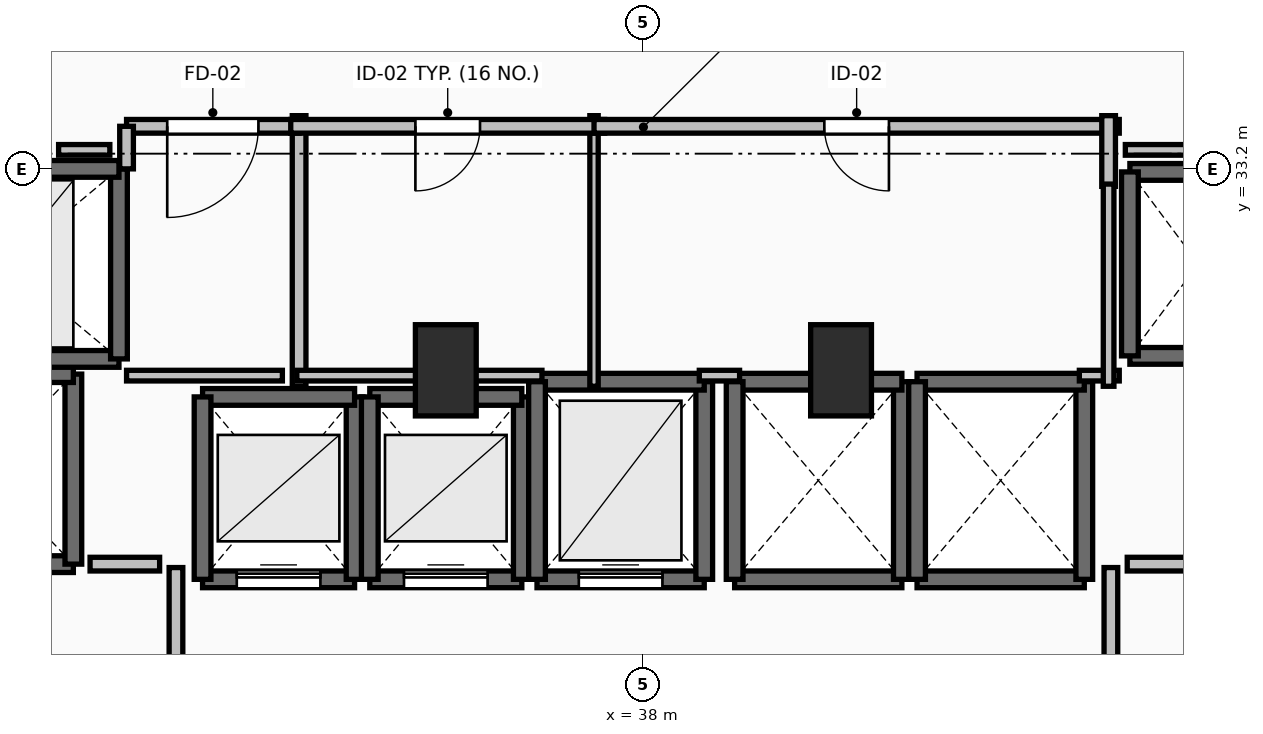
"""IFC4 building model, lengths in metres.
Left out: names, types, materials, properties, quantities, classifications, styles, units other than length and angle.
Written with IfcOpenShell. Run it as: python <this file> out.ifc"""

import sys

from ifc_helpers import new_model, si_unit, direction, frame, frame_2d, origin, origin_2d, place, context, subcontext, project, spatial, rectangle, extrude, element, fill, save


model = new_model("IFC4")
c1 = context("Model", 3, precision=1e-05, world=origin(), true_north=direction((0.0, 1.0)))
c2 = subcontext(c1, "Body", "Model", "MODEL_VIEW")
j1 = project(units=[si_unit("LENGTHUNIT", "METRE"), si_unit("PLANEANGLEUNIT", "RADIAN")], contexts=[c1])
p1 = place(None, origin())
s1 = spatial("IfcSite", under=j1, at=p1, CompositionType="ELEMENT")
p2 = place(p1, origin())
s2 = spatial("IfcBuilding", under=s1, at=p2, CompositionType="ELEMENT")
p3 = place(p2, frame((0.0, 0.0, 96.3)))
s3 = spatial("IfcBuildingStorey", under=s2, at=p3, CompositionType="ELEMENT", Elevation=96.3)
for number, where, z_axis, x_axis in (
    (1, (35.4, 30.55, 0.0), (0.0, 0.0, 1.0), (1.0, 0.0, 0.0)),
    (2, (40.6, 30.55, 0.0), (0.0, 0.0, 1.0), (1.0, 0.0, 0.0)),
):
    element("IfcColumn", number, at=place(p3, frame(where, z_axis=z_axis, x_axis=x_axis)), inside=s3, PredefinedType="PILASTER", context=c2, shape_type="SweptSolid", body=[
        extrude(rectangle(XDim=0.8, YDim=1.2, at=origin_2d()), origin(), (0.0, 0.0, 1.0), 3.5),
    ])
p4 = place(p3, frame((32.2, 27.8, 0.0), z_axis=(0.0, 0.0, 1.0), x_axis=(1.0, 0.0, 0.0)))
e3 = element("IfcWall", 3, at=p4, inside=s3, PredefinedType="SOLIDWALL", context=c2, shape_type="SweptSolid", body=[
    extrude(rectangle(XDim=2.0, YDim=0.22, at=frame_2d((1.0, 0.0))), origin(), (0.0, 0.0, 1.0), 3.24),
])
p5 = place(p4, frame((0.45, 0.0, 0.0)))
e4 = element("IfcOpeningElement", 4, at=p5, cuts=e3, PredefinedType="OPENING", context=c2, shape_type="SweptSolid", body=[
    extrude(rectangle(XDim=1.1, YDim=2.2, at=frame_2d((0.55, 1.1))), frame((0.0, 0.125, 0.0), z_axis=(0.0, -1.0, 0.0), x_axis=(1.0, 0.0, 0.0)), (0.0, 0.0, 1.0), 0.25),
])
p6 = place(p3, frame((34.2, 27.8, 0.0), z_axis=(0.0, 0.0, 1.0), x_axis=(0.0, 1.0, 0.0)))
e5 = element("IfcWall", 5, at=p6, inside=s3, PredefinedType="SOLIDWALL", context=c2, shape_type="SweptSolid", body=[
    extrude(rectangle(XDim=2.4, YDim=0.22, at=frame_2d((1.2, 0.0))), origin(), (0.0, 0.0, 1.0), 3.24),
])
p7 = place(p3, frame((34.2, 30.2, 0.0), z_axis=(0.0, 0.0, 1.0), x_axis=(-1.0, 0.0, 0.0)))
e6 = element("IfcWall", 6, at=p7, inside=s3, PredefinedType="SOLIDWALL", context=c2, shape_type="SweptSolid", body=[
    extrude(rectangle(XDim=2.0, YDim=0.22, at=frame_2d((1.0, 0.0))), origin(), (0.0, 0.0, 1.0), 3.24),
])
p8 = place(p3, frame((32.2, 30.2, 0.0), z_axis=(0.0, 0.0, 1.0), x_axis=(0.0, -1.0, 0.0)))
e7 = element("IfcWall", 7, at=p8, inside=s3, PredefinedType="SOLIDWALL", context=c2, shape_type="SweptSolid", body=[
    extrude(rectangle(XDim=2.4, YDim=0.22, at=frame_2d((1.2, 0.0))), origin(), (0.0, 0.0, 1.0), 3.24),
])
p9 = place(p3, frame((34.4, 27.8, 0.0), z_axis=(0.0, 0.0, 1.0), x_axis=(1.0, 0.0, 0.0)))
e8 = element("IfcWall", 8, at=p9, inside=s3, PredefinedType="SOLIDWALL", context=c2, shape_type="SweptSolid", body=[
    extrude(rectangle(XDim=2.0, YDim=0.22, at=frame_2d((1.0, 0.0))), origin(), (0.0, 0.0, 1.0), 3.24),
])
p10 = place(p9, frame((0.45, 0.0, 0.0)))
e9 = element("IfcOpeningElement", 9, at=p10, cuts=e8, PredefinedType="OPENING", context=c2, shape_type="SweptSolid", body=[
    extrude(rectangle(XDim=1.1, YDim=2.2, at=frame_2d((0.55, 1.1))), frame((0.0, 0.125, 0.0), z_axis=(0.0, -1.0, 0.0), x_axis=(1.0, 0.0, 0.0)), (0.0, 0.0, 1.0), 0.25),
])
p11 = place(p3, frame((36.4, 27.8, 0.0), z_axis=(0.0, 0.0, 1.0), x_axis=(0.0, 1.0, 0.0)))
e10 = element("IfcWall", 10, at=p11, inside=s3, PredefinedType="SOLIDWALL", context=c2, shape_type="SweptSolid", body=[
    extrude(rectangle(XDim=2.4, YDim=0.22, at=frame_2d((1.2, 0.0))), origin(), (0.0, 0.0, 1.0), 3.24),
])
p12 = place(p3, frame((36.4, 30.2, 0.0), z_axis=(0.0, 0.0, 1.0), x_axis=(-1.0, 0.0, 0.0)))
e11 = element("IfcWall", 11, at=p12, inside=s3, PredefinedType="SOLIDWALL", context=c2, shape_type="SweptSolid", body=[
    extrude(rectangle(XDim=2.0, YDim=0.22, at=frame_2d((1.0, 0.0))), origin(), (0.0, 0.0, 1.0), 3.24),
])
p13 = place(p3, frame((34.4, 30.2, 0.0), z_axis=(0.0, 0.0, 1.0), x_axis=(0.0, -1.0, 0.0)))
e12 = element("IfcWall", 12, at=p13, inside=s3, PredefinedType="SOLIDWALL", context=c2, shape_type="SweptSolid", body=[
    extrude(rectangle(XDim=2.4, YDim=0.22, at=frame_2d((1.2, 0.0))), origin(), (0.0, 0.0, 1.0), 3.24),
])
p14 = place(p3, frame((36.6, 27.8, 0.0), z_axis=(0.0, 0.0, 1.0), x_axis=(1.0, 0.0, 0.0)))
e13 = element("IfcWall", 13, at=p14, inside=s3, PredefinedType="SOLIDWALL", context=c2, shape_type="SweptSolid", body=[
    extrude(rectangle(XDim=2.2, YDim=0.22, at=frame_2d((1.1, 0.0))), origin(), (0.0, 0.0, 1.0), 3.24),
])
p15 = place(p14, frame((0.55, 0.0, 0.0)))
e14 = element("IfcOpeningElement", 14, at=p15, cuts=e13, PredefinedType="OPENING", context=c2, shape_type="SweptSolid", body=[
    extrude(rectangle(XDim=1.1, YDim=2.2, at=frame_2d((0.55, 1.1))), frame((0.0, 0.125, 0.0), z_axis=(0.0, -1.0, 0.0), x_axis=(1.0, 0.0, 0.0)), (0.0, 0.0, 1.0), 0.25),
])
p16 = place(p3, frame((38.8, 27.8, 0.0), z_axis=(0.0, 0.0, 1.0), x_axis=(0.0, 1.0, 0.0)))
e15 = element("IfcWall", 15, at=p16, inside=s3, PredefinedType="SOLIDWALL", context=c2, shape_type="SweptSolid", body=[
    extrude(rectangle(XDim=2.6, YDim=0.22, at=frame_2d((1.3, 0.0))), origin(), (0.0, 0.0, 1.0), 3.24),
])
p17 = place(p3, frame((38.8, 30.4, 0.0), z_axis=(0.0, 0.0, 1.0), x_axis=(-1.0, 0.0, 0.0)))
e16 = element("IfcWall", 16, at=p17, inside=s3, PredefinedType="SOLIDWALL", context=c2, shape_type="SweptSolid", body=[
    extrude(rectangle(XDim=2.2, YDim=0.22, at=frame_2d((1.1, 0.0))), origin(), (0.0, 0.0, 1.0), 3.24),
])
p18 = place(p3, frame((36.6, 30.4, 0.0), z_axis=(0.0, 0.0, 1.0), x_axis=(0.0, -1.0, 0.0)))
e17 = element("IfcWall", 17, at=p18, inside=s3, PredefinedType="SOLIDWALL", context=c2, shape_type="SweptSolid", body=[
    extrude(rectangle(XDim=2.6, YDim=0.22, at=frame_2d((1.3, 0.0))), origin(), (0.0, 0.0, 1.0), 3.24),
])
p19 = place(p3, frame((39.2, 27.8, 0.0), z_axis=(0.0, 0.0, 1.0), x_axis=(1.0, 0.0, 0.0)))
e18 = element("IfcWall", 18, at=p19, inside=s3, PredefinedType="SOLIDWALL", context=c2, shape_type="SweptSolid", body=[
    extrude(rectangle(XDim=2.2, YDim=0.22, at=frame_2d((1.1, 0.0))), origin(), (0.0, 0.0, 1.0), 3.24),
])
p20 = place(p3, frame((41.4, 27.8, 0.0), z_axis=(0.0, 0.0, 1.0), x_axis=(0.0, 1.0, 0.0)))
e19 = element("IfcWall", 19, at=p20, inside=s3, PredefinedType="SOLIDWALL", context=c2, shape_type="SweptSolid", body=[
    extrude(rectangle(XDim=2.6, YDim=0.22, at=frame_2d((1.3, 0.0))), origin(), (0.0, 0.0, 1.0), 3.24),
])
p21 = place(p3, frame((41.4, 30.4, 0.0), z_axis=(0.0, 0.0, 1.0), x_axis=(-1.0, 0.0, 0.0)))
e20 = element("IfcWall", 20, at=p21, inside=s3, PredefinedType="SOLIDWALL", context=c2, shape_type="SweptSolid", body=[
    extrude(rectangle(XDim=2.2, YDim=0.22, at=frame_2d((1.1, 0.0))), origin(), (0.0, 0.0, 1.0), 3.24),
])
p22 = place(p3, frame((39.2, 30.4, 0.0), z_axis=(0.0, 0.0, 1.0), x_axis=(0.0, -1.0, 0.0)))
e21 = element("IfcWall", 21, at=p22, inside=s3, PredefinedType="SOLIDWALL", context=c2, shape_type="SweptSolid", body=[
    extrude(rectangle(XDim=2.6, YDim=0.22, at=frame_2d((1.3, 0.0))), origin(), (0.0, 0.0, 1.0), 3.24),
])
p23 = place(p3, frame((41.6, 27.8, 0.0), z_axis=(0.0, 0.0, 1.0), x_axis=(1.0, 0.0, 0.0)))
e22 = element("IfcWall", 22, at=p23, inside=s3, PredefinedType="SOLIDWALL", context=c2, shape_type="SweptSolid", body=[
    extrude(rectangle(XDim=2.2, YDim=0.22, at=frame_2d((1.1, 0.0))), origin(), (0.0, 0.0, 1.0), 3.24),
])
p24 = place(p3, frame((43.8, 27.8, 0.0), z_axis=(0.0, 0.0, 1.0), x_axis=(0.0, 1.0, 0.0)))
e23 = element("IfcWall", 23, at=p24, inside=s3, PredefinedType="SOLIDWALL", context=c2, shape_type="SweptSolid", body=[
    extrude(rectangle(XDim=2.6, YDim=0.22, at=frame_2d((1.3, 0.0))), origin(), (0.0, 0.0, 1.0), 3.24),
])
p25 = place(p3, frame((43.8, 30.4, 0.0), z_axis=(0.0, 0.0, 1.0), x_axis=(-1.0, 0.0, 0.0)))
e24 = element("IfcWall", 24, at=p25, inside=s3, PredefinedType="SOLIDWALL", context=c2, shape_type="SweptSolid", body=[
    extrude(rectangle(XDim=2.2, YDim=0.22, at=frame_2d((1.1, 0.0))), origin(), (0.0, 0.0, 1.0), 3.24),
])
p26 = place(p3, frame((41.6, 30.4, 0.0), z_axis=(0.0, 0.0, 1.0), x_axis=(0.0, -1.0, 0.0)))
e25 = element("IfcWall", 25, at=p26, inside=s3, PredefinedType="SOLIDWALL", context=c2, shape_type="SweptSolid", body=[
    extrude(rectangle(XDim=2.6, YDim=0.22, at=frame_2d((1.3, 0.0))), origin(), (0.0, 0.0, 1.0), 3.24),
])
for number, where, z_axis, x_axis in (
    (26, (44.4, 30.74, 0.0), (0.0, 0.0, 1.0), (1.0, 0.0, 0.0)),
    (27, (46.2, 33.16, 0.0), (0.0, 0.0, 1.0), (-1.0, 0.0, 0.0)),
):
    element("IfcWall", number, at=place(p3, frame(where, z_axis=z_axis, x_axis=x_axis)), inside=s3, PredefinedType="SOLIDWALL", context=c2, shape_type="SweptSolid", body=[
        extrude(rectangle(XDim=1.8, YDim=0.22, at=frame_2d((0.9, 0.0))), origin(), (0.0, 0.0, 1.0), 3.24),
    ])
p27 = place(p3, frame((44.4, 33.16, 0.0), z_axis=(0.0, 0.0, 1.0), x_axis=(0.0, -1.0, 0.0)))
e28 = element("IfcWall", 28, at=p27, inside=s3, PredefinedType="SOLIDWALL", context=c2, shape_type="SweptSolid", body=[
    extrude(rectangle(XDim=2.42, YDim=0.22, at=frame_2d((1.21, 0.0))), origin(), (0.0, 0.0, 1.0), 3.24),
])
p28 = place(p3, frame((28.1, 28.0, 0.0), z_axis=(0.0, 0.0, 1.0), x_axis=(1.0, 0.0, 0.0)))
e29 = element("IfcWall", 29, at=p28, inside=s3, PredefinedType="SHEAR", context=c2, shape_type="SweptSolid", body=[
    extrude(rectangle(XDim=2.4, YDim=0.22, at=frame_2d((1.2, 0.0))), origin(), (0.0, 0.0, 1.0), 3.24),
])
p29 = place(p28, frame((0.6, 0.0, 0.0)))
e30 = element("IfcOpeningElement", 30, at=p29, cuts=e29, PredefinedType="OPENING", context=c2, shape_type="SweptSolid", body=[
    extrude(rectangle(XDim=1.2, YDim=2.2, at=frame_2d((0.6, 1.1))), frame((0.0, 0.125, 0.0), z_axis=(0.0, -1.0, 0.0), x_axis=(1.0, 0.0, 0.0)), (0.0, 0.0, 1.0), 0.25),
])
p30 = place(p3, frame((30.5, 28.0, 0.0), z_axis=(0.0, 0.0, 1.0), x_axis=(0.0, 1.0, 0.0)))
e31 = element("IfcWall", 31, at=p30, inside=s3, PredefinedType="SHEAR", context=c2, shape_type="SweptSolid", body=[
    extrude(rectangle(XDim=2.5, YDim=0.22, at=frame_2d((1.25, 0.0))), origin(), (0.0, 0.0, 1.0), 3.24),
])
p31 = place(p3, frame((30.5, 30.5, 0.0), z_axis=(0.0, 0.0, 1.0), x_axis=(-1.0, 0.0, 0.0)))
e32 = element("IfcWall", 32, at=p31, inside=s3, PredefinedType="SHEAR", context=c2, shape_type="SweptSolid", body=[
    extrude(rectangle(XDim=2.4, YDim=0.22, at=frame_2d((1.2, 0.0))), origin(), (0.0, 0.0, 1.0), 3.24),
])
p32 = place(p3, frame((28.1, 30.7, 0.0), z_axis=(0.0, 0.0, 1.0), x_axis=(1.0, 0.0, 0.0)))
e33 = element("IfcWall", 33, at=p32, inside=s3, PredefinedType="SOLIDWALL", context=c2, shape_type="SweptSolid", body=[
    extrude(rectangle(XDim=3.0, YDim=0.22, at=frame_2d((1.5, 0.0))), origin(), (0.0, 0.0, 1.0), 3.24),
])
p33 = place(p3, frame((31.1, 30.7, 0.0), z_axis=(0.0, 0.0, 1.0), x_axis=(0.0, 1.0, 0.0)))
e34 = element("IfcWall", 34, at=p33, inside=s3, PredefinedType="SOLIDWALL", context=c2, shape_type="SweptSolid", body=[
    extrude(rectangle(XDim=2.5, YDim=0.22, at=frame_2d((1.25, 0.0))), origin(), (0.0, 0.0, 1.0), 3.24),
])
p34 = place(p3, frame((31.1, 33.2, 0.0), z_axis=(0.0, 0.0, 1.0), x_axis=(-1.0, 0.0, 0.0)))
e35 = element("IfcWall", 35, at=p34, inside=s3, PredefinedType="SOLIDWALL", context=c2, shape_type="SweptSolid", body=[
    extrude(rectangle(XDim=3.0, YDim=0.22, at=frame_2d((1.5, 0.0))), origin(), (0.0, 0.0, 1.0), 3.24),
])
p35 = place(p34, frame((0.9, 0.0, 0.0)))
e36 = element("IfcOpeningElement", 36, at=p35, cuts=e35, PredefinedType="OPENING", context=c2, shape_type="SweptSolid", body=[
    extrude(rectangle(XDim=1.2, YDim=2.2, at=frame_2d((0.6, 1.1))), frame((0.0, 0.125, 0.0), z_axis=(0.0, -1.0, 0.0), x_axis=(1.0, 0.0, 0.0)), (0.0, 0.0, 1.0), 0.25),
])
p36 = place(p3, frame((31.85, 24.045, 0.0), z_axis=(0.0, 0.0, 1.0), x_axis=(0.0, 1.0, 0.0)))
e37 = element("IfcWall", 37, at=p36, inside=s3, PredefinedType="PARTITIONING", context=c2, shape_type="SweptSolid", body=[
    extrude(rectangle(XDim=3.91, YDim=0.18, at=frame_2d((1.955, 0.0))), origin(), (0.0, 0.0, 1.0), 3.24),
])
p37 = place(p36, frame((1.355, 0.0, 0.0)))
e38 = element("IfcOpeningElement", 38, at=p37, cuts=e37, PredefinedType="OPENING", context=c2, shape_type="SweptSolid", body=[
    extrude(rectangle(XDim=1.2, YDim=2.15, at=frame_2d((0.6, 1.075))), frame((0.0, 0.105, 0.0), z_axis=(0.0, -1.0, 0.0), x_axis=(1.0, 0.0, 0.0)), (0.0, 0.0, 1.0), 0.21),
])
p38 = place(p3, frame((44.15, 27.955, 0.0), z_axis=(0.0, 0.0, 1.0), x_axis=(0.0, -1.0, 0.0)))
e39 = element("IfcWall", 39, at=p38, inside=s3, PredefinedType="PARTITIONING", context=c2, shape_type="SweptSolid", body=[
    extrude(rectangle(XDim=3.91, YDim=0.18, at=frame_2d((1.955, 0.0))), origin(), (0.0, 0.0, 1.0), 3.24),
])
p39 = place(p38, frame((1.355, 0.0, 0.0)))
e40 = element("IfcOpeningElement", 40, at=p39, cuts=e39, PredefinedType="OPENING", context=c2, shape_type="SweptSolid", body=[
    extrude(rectangle(XDim=1.2, YDim=2.15, at=frame_2d((0.6, 1.075))), frame((0.0, 0.105, 0.0), z_axis=(0.0, -1.0, 0.0), x_axis=(1.0, 0.0, 0.0)), (0.0, 0.0, 1.0), 0.21),
])
p40 = place(p3, frame((33.47, 30.34, 0.0), z_axis=(0.0, 0.0, 1.0), x_axis=(0.0, 1.0, 0.0)))
e41 = element("IfcWall", 41, at=p40, inside=s3, PredefinedType="PARTITIONING", context=c2, shape_type="SweptSolid", body=[
    extrude(rectangle(XDim=3.56, YDim=0.18, at=frame_2d((1.78, 0.0))), origin(), (0.0, 0.0, 1.0), 3.24),
])
p41 = place(p3, frame((33.47, 33.76, 0.0), z_axis=(0.0, 0.0, 1.0), x_axis=(-1.0, 0.0, 0.0)))
e42 = element("IfcWall", 42, at=p41, inside=s3, PredefinedType="PARTITIONING", context=c2, shape_type="SweptSolid", body=[
    extrude(rectangle(XDim=2.27, YDim=0.18, at=frame_2d((1.135, 0.0))), origin(), (0.0, 0.0, 1.0), 3.24),
])
p42 = place(p41, frame((0.535, 0.0, 0.0)))
e43 = element("IfcOpeningElement", 43, at=p42, cuts=e42, PredefinedType="OPENING", context=c2, shape_type="SweptSolid", body=[
    extrude(rectangle(XDim=1.2, YDim=2.15, at=frame_2d((0.6, 1.075))), frame((0.0, 0.105, 0.0), z_axis=(0.0, -1.0, 0.0), x_axis=(1.0, 0.0, 0.0)), (0.0, 0.0, 1.0), 0.21),
])
p43 = place(p3, frame((31.2, 33.76, 0.0), z_axis=(0.0, 0.0, 1.0), x_axis=(0.0, -1.0, 0.0)))
e44 = element("IfcWall", 44, at=p43, inside=s3, PredefinedType="PARTITIONING", context=c2, shape_type="SweptSolid", body=[
    extrude(rectangle(XDim=0.56, YDim=0.18, at=frame_2d((0.28, 0.0))), origin(), (0.0, 0.0, 1.0), 3.24),
])
p44 = place(p3, frame((37.35, 30.34, 0.0), z_axis=(0.0, 0.0, 1.0), x_axis=(0.0, 1.0, 0.0)))
e45 = element("IfcWall", 45, at=p44, inside=s3, PredefinedType="PARTITIONING", context=c2, shape_type="SweptSolid", body=[
    extrude(rectangle(XDim=3.56, YDim=0.11, at=frame_2d((1.78, 0.0))), origin(), (0.0, 0.0, 1.0), 2.432),
])
p45 = place(p3, frame((37.49, 33.76, 0.0), z_axis=(0.0, 0.0, 1.0), x_axis=(-1.0, 0.0, 0.0)))
e46 = element("IfcWall", 46, at=p45, inside=s3, PredefinedType="PARTITIONING", context=c2, shape_type="SweptSolid", body=[
    extrude(rectangle(XDim=4.13, YDim=0.18, at=frame_2d((2.065, 0.0))), origin(), (0.0, 0.0, 1.0), 3.24),
])
p46 = place(p45, frame((1.64, 0.0, 0.0)))
e47 = element("IfcOpeningElement", 47, at=p46, cuts=e46, PredefinedType="OPENING", context=c2, shape_type="SweptSolid", body=[
    extrude(rectangle(XDim=0.85, YDim=2.1, at=frame_2d((0.425, 1.05))), frame((0.0, 0.105, 0.0), z_axis=(0.0, -1.0, 0.0), x_axis=(1.0, 0.0, 0.0)), (0.0, 0.0, 1.0), 0.21),
])
p47 = place(p3, frame((44.26, 33.76, 0.0), z_axis=(0.0, 0.0, 1.0), x_axis=(-1.0, 0.0, 0.0)))
e48 = element("IfcWall", 48, at=p47, inside=s3, PredefinedType="PARTITIONING", context=c2, shape_type="SweptSolid", body=[
    extrude(rectangle(XDim=6.91, YDim=0.18, at=frame_2d((3.455, 0.0))), origin(), (0.0, 0.0, 1.0), 3.24),
])
p48 = place(p47, frame((3.03, 0.0, 0.0)))
e49 = element("IfcOpeningElement", 49, at=p48, cuts=e48, PredefinedType="OPENING", context=c2, shape_type="SweptSolid", body=[
    extrude(rectangle(XDim=0.85, YDim=2.1, at=frame_2d((0.425, 1.05))), frame((0.0, 0.105, 0.0), z_axis=(0.0, -1.0, 0.0), x_axis=(1.0, 0.0, 0.0)), (0.0, 0.0, 1.0), 0.21),
])
p49 = place(p3, frame((44.12, 32.97, 0.0), z_axis=(0.0, 0.0, 1.0), x_axis=(0.0, 1.0, 0.0)))
e50 = element("IfcWall", 50, at=p49, inside=s3, PredefinedType="PARTITIONING", context=c2, shape_type="SweptSolid", body=[
    extrude(rectangle(XDim=0.93, YDim=0.18, at=frame_2d((0.465, 0.0))), origin(), (0.0, 0.0, 1.0), 3.24),
])
for number, where, z_axis, x_axis in (
    (51, (31.635, 28.0, 0.0), (0.0, 0.0, 1.0), (-1.0, 0.0, 0.0)),
    (52, (45.28, 28.0, 0.0), (0.0, 0.0, 1.0), (-1.0, 0.0, 0.0)),
):
    element("IfcWall", number, at=place(p3, frame(where, z_axis=z_axis, x_axis=x_axis)), inside=s3, PredefinedType="PARTITIONING", context=c2, shape_type="SweptSolid", body=[
        extrude(rectangle(XDim=0.915, YDim=0.18, at=frame_2d((0.458, 0.0))), origin(), (0.0, 0.0, 1.0), 3.24),
    ])
p50 = place(p3, frame((31.2, 30.48, 0.0), z_axis=(0.0, 0.0, 1.0), x_axis=(1.0, 0.0, 0.0)))
e53 = element("IfcWall", 53, at=p50, inside=s3, PredefinedType="PARTITIONING", context=c2, shape_type="SweptSolid", body=[
    extrude(rectangle(XDim=2.05, YDim=0.14, at=frame_2d((1.025, 0.0))), origin(), (0.0, 0.0, 1.0), 3.24),
])
p51 = place(p3, frame((33.44, 30.48, 0.0), z_axis=(0.0, 0.0, 1.0), x_axis=(1.0, 0.0, 0.0)))
e54 = element("IfcWall", 54, at=p51, inside=s3, PredefinedType="PARTITIONING", context=c2, shape_type="SweptSolid", body=[
    extrude(rectangle(XDim=3.225, YDim=0.14, at=frame_2d((1.613, 0.0))), origin(), (0.0, 0.0, 1.0), 2.432),
])
p52 = place(p3, frame((38.735, 30.48, 0.0), z_axis=(0.0, 0.0, 1.0), x_axis=(1.0, 0.0, 0.0)))
e55 = element("IfcWall", 55, at=p52, inside=s3, PredefinedType="PARTITIONING", context=c2, shape_type="SweptSolid", body=[
    extrude(rectangle(XDim=0.53, YDim=0.14, at=frame_2d((0.265, 0.0))), origin(), (0.0, 0.0, 1.0), 2.432),
])
p53 = place(p3, frame((43.735, 30.48, 0.0), z_axis=(0.0, 0.0, 1.0), x_axis=(1.0, 0.0, 0.0)))
e56 = element("IfcWall", 56, at=p53, inside=s3, PredefinedType="PARTITIONING", context=c2, shape_type="SweptSolid", body=[
    extrude(rectangle(XDim=0.525, YDim=0.14, at=frame_2d((0.262, 0.0))), origin(), (0.0, 0.0, 1.0), 3.24),
])
p54 = place(p3, frame((44.12, 30.34, 0.0), z_axis=(0.0, 0.0, 1.0), x_axis=(0.0, 1.0, 0.0)))
e57 = element("IfcWall", 57, at=p54, inside=s3, PredefinedType="PARTITIONING", context=c2, shape_type="SweptSolid", body=[
    extrude(rectangle(XDim=2.66, YDim=0.14, at=frame_2d((1.33, 0.0))), origin(), (0.0, 0.0, 1.0), 3.24),
])
p55 = place(p3, frame((44.34, 33.45, 0.0), z_axis=(0.0, 0.0, 1.0), x_axis=(1.0, 0.0, 0.0)))
e58 = element("IfcWall", 58, at=p55, inside=s3, PredefinedType="PARTITIONING", context=c2, shape_type="SweptSolid", body=[
    extrude(rectangle(XDim=4.21, YDim=0.14, at=frame_2d((2.105, 0.0))), origin(), (0.0, 0.0, 1.0), 2.432),
])
p56 = place(p3, frame((30.306, 33.45, 0.0), z_axis=(0.0, 0.0, 1.0), x_axis=(1.0, 0.0, 0.0)))
e59 = element("IfcWall", 59, at=p56, inside=s3, PredefinedType="PARTITIONING", context=c2, shape_type="SweptSolid", body=[
    extrude(rectangle(XDim=0.674, YDim=0.14, at=frame_2d((0.337, 0.0))), origin(), (0.0, 0.0, 1.0), 3.24),
])
p57 = place(p5, origin())
e60 = element("IfcDoor", 60, at=p57, inside=s3, OperationType="SLIDING_TO_LEFT", PredefinedType="DOOR", context=c2, shape_type="SweptSolid", body=[
    extrude(rectangle(XDim=1.1, YDim=2.2, at=frame_2d((0.55, 1.1))), frame((0.0, 0.025, 0.0), z_axis=(0.0, -1.0, 0.0), x_axis=(1.0, 0.0, 0.0)), (0.0, 0.0, 1.0), 0.05),
])
fill(e4, e60)
p58 = place(p10, origin())
e61 = element("IfcDoor", 61, at=p58, inside=s3, OperationType="SLIDING_TO_LEFT", PredefinedType="DOOR", context=c2, shape_type="SweptSolid", body=[
    extrude(rectangle(XDim=1.1, YDim=2.2, at=frame_2d((0.55, 1.1))), frame((0.0, 0.025, 0.0), z_axis=(0.0, -1.0, 0.0), x_axis=(1.0, 0.0, 0.0)), (0.0, 0.0, 1.0), 0.05),
])
fill(e9, e61)
p59 = place(p15, origin())
e62 = element("IfcDoor", 62, at=p59, inside=s3, OperationType="SLIDING_TO_LEFT", PredefinedType="DOOR", context=c2, shape_type="SweptSolid", body=[
    extrude(rectangle(XDim=1.1, YDim=2.2, at=frame_2d((0.55, 1.1))), frame((0.0, 0.025, 0.0), z_axis=(0.0, -1.0, 0.0), x_axis=(1.0, 0.0, 0.0)), (0.0, 0.0, 1.0), 0.05),
])
fill(e14, e62)
p60 = place(p42, origin())
e63 = element("IfcDoor", 63, at=p60, inside=s3, OperationType="SINGLE_SWING_RIGHT", PredefinedType="DOOR", context=c2, shape_type="SweptSolid", body=[
    extrude(rectangle(XDim=1.2, YDim=2.15, at=frame_2d((0.6, 1.075))), frame((0.0, 0.025, 0.0), z_axis=(0.0, -1.0, 0.0), x_axis=(1.0, 0.0, 0.0)), (0.0, 0.0, 1.0), 0.05),
])
fill(e43, e63)
p61 = place(p46, origin())
e64 = element("IfcDoor", 64, at=p61, inside=s3, OperationType="SINGLE_SWING_RIGHT", PredefinedType="DOOR", context=c2, shape_type="SweptSolid", body=[
    extrude(rectangle(XDim=0.85, YDim=2.1, at=frame_2d((0.425, 1.05))), frame((0.0, 0.025, 0.0), z_axis=(0.0, -1.0, 0.0), x_axis=(1.0, 0.0, 0.0)), (0.0, 0.0, 1.0), 0.05),
])
fill(e47, e64)
p62 = place(p48, origin())
e65 = element("IfcDoor", 65, at=p62, inside=s3, OperationType="SINGLE_SWING_LEFT", PredefinedType="DOOR", context=c2, shape_type="SweptSolid", body=[
    extrude(rectangle(XDim=0.85, YDim=2.1, at=frame_2d((0.425, 1.05))), frame((0.0, 0.025, 0.0), z_axis=(0.0, -1.0, 0.0), x_axis=(1.0, 0.0, 0.0)), (0.0, 0.0, 1.0), 0.05),
])
fill(e49, e65)
save(model, sys.argv[1])
